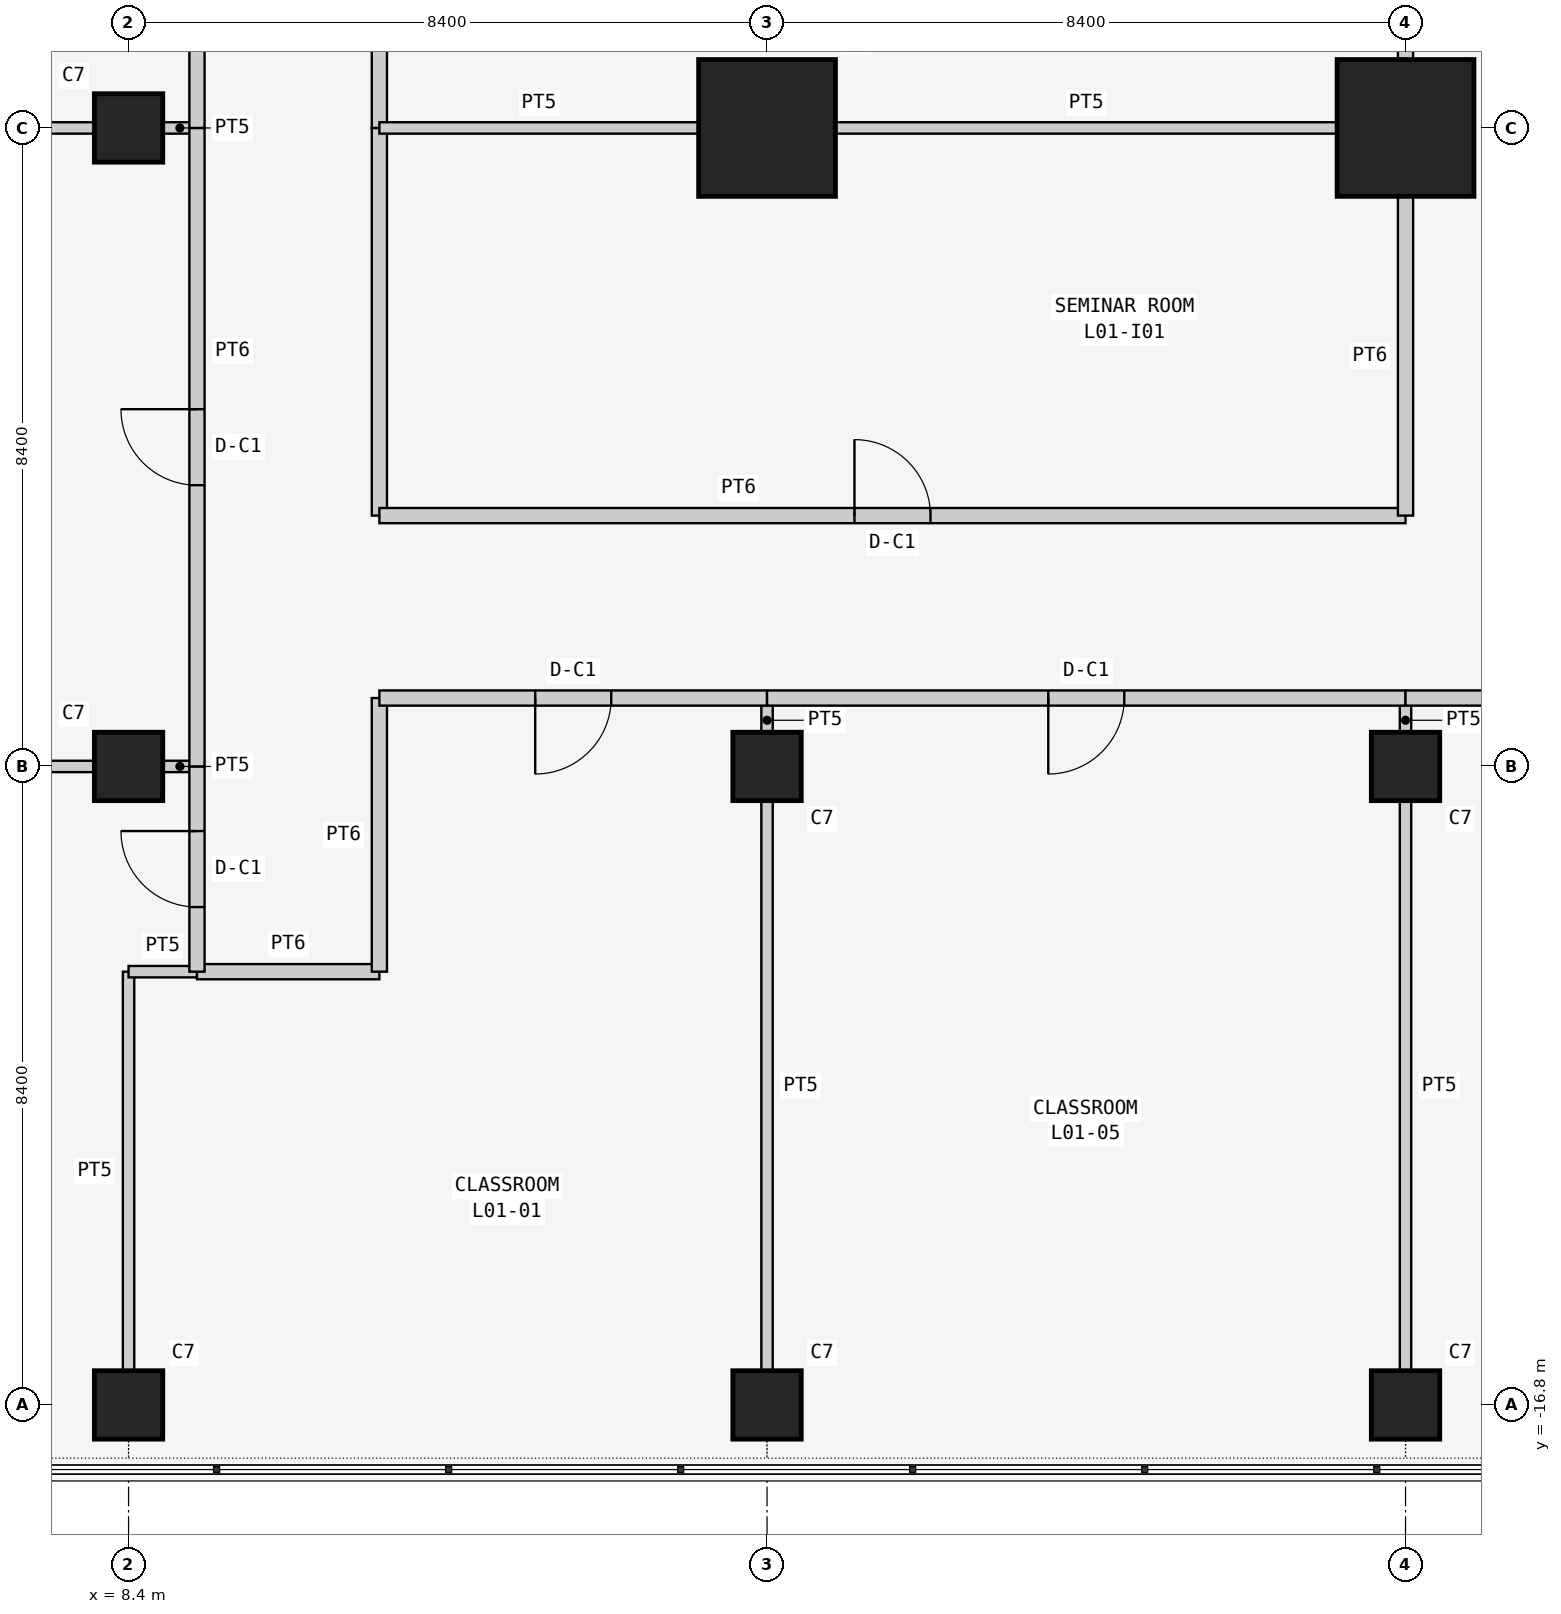
"""IFC4 building model, lengths in metres.
Left out: names, types, materials, properties, quantities, classifications, styles, units other than length and angle.
Written with IfcOpenShell. Run it as: python <this file> out.ifc"""

import sys

from ifc_helpers import new_model, si_unit, direction, frame, frame_2d, origin, origin_2d, place, context, subcontext, project, spatial, rectangle, extrude, element, fill, save


model = new_model("IFC4")
c1 = context("Model", 3, precision=1e-05, world=origin(), true_north=direction((0.0, 1.0)))
c2 = subcontext(c1, "Body", "Model", "MODEL_VIEW")
j1 = project(units=[si_unit("LENGTHUNIT", "METRE"), si_unit("PLANEANGLEUNIT", "RADIAN")], contexts=[c1])
p1 = place(None, origin())
s1 = spatial("IfcSite", under=j1, at=p1, CompositionType="ELEMENT")
p2 = place(p1, origin())
s2 = spatial("IfcBuilding", under=s1, at=p2, CompositionType="ELEMENT")
p3 = place(p2, frame((0.0, 0.0, 6.0)))
s3 = spatial("IfcBuildingStorey", under=s2, at=p3, CompositionType="ELEMENT", Elevation=6.0)
for number, where, z_axis, x_axis in (
    (1, (8.4, -16.8, 0.0), (0.0, 0.0, 1.0), (1.0, 0.0, 0.0)),
    (2, (8.4, -8.4, 0.0), (0.0, 0.0, 1.0), (1.0, 0.0, 0.0)),
    (3, (8.4, 0.0, 0.0), (0.0, 0.0, 1.0), (1.0, 0.0, 0.0)),
    (4, (16.8, -16.8, 0.0), (0.0, 0.0, 1.0), (1.0, 0.0, 0.0)),
    (5, (16.8, -8.4, 0.0), (0.0, 0.0, 1.0), (1.0, 0.0, 0.0)),
):
    element("IfcColumn", number, at=place(p3, frame(where, z_axis=z_axis, x_axis=x_axis)), inside=s3, PredefinedType="COLUMN", context=c2, shape_type="SweptSolid", body=[
        extrude(rectangle(XDim=0.9, YDim=0.9, at=origin_2d()), origin(), (0.0, 0.0, 1.0), 4.5),
    ])
p4 = place(p3, frame((16.8, 0.0, 0.0), z_axis=(0.0, 0.0, 1.0), x_axis=(1.0, 0.0, 0.0)))
e6 = element("IfcColumn", 6, at=p4, inside=s3, PredefinedType="COLUMN", context=c2, shape_type="SweptSolid", body=[
    extrude(rectangle(XDim=1.8, YDim=1.8, at=origin_2d()), origin(), (0.0, 0.0, 1.0), 4.5),
])
for number, where, z_axis, x_axis in (
    (7, (25.2, -16.8, 0.0), (0.0, 0.0, 1.0), (1.0, 0.0, 0.0)),
    (8, (25.2, -8.4, 0.0), (0.0, 0.0, 1.0), (1.0, 0.0, 0.0)),
):
    element("IfcColumn", number, at=place(p3, frame(where, z_axis=z_axis, x_axis=x_axis)), inside=s3, PredefinedType="COLUMN", context=c2, shape_type="SweptSolid", body=[
        extrude(rectangle(XDim=0.9, YDim=0.9, at=origin_2d()), origin(), (0.0, 0.0, 1.0), 4.5),
    ])
p5 = place(p3, frame((25.2, 0.0, 0.0), z_axis=(0.0, 0.0, 1.0), x_axis=(1.0, 0.0, 0.0)))
e9 = element("IfcColumn", 9, at=p5, inside=s3, PredefinedType="COLUMN", context=c2, shape_type="SweptSolid", body=[
    extrude(rectangle(XDim=1.8, YDim=1.8, at=origin_2d()), origin(), (0.0, 0.0, 1.0), 4.5),
])
p6 = place(p3, frame((8.4, -16.35, 0.0), z_axis=(0.0, 0.0, 1.0), x_axis=(0.0, 1.0, 0.0)))
e10 = element("IfcWall", 10, at=p6, inside=s3, PredefinedType="PARTITIONING", context=c2, shape_type="SweptSolid", body=[
    extrude(rectangle(XDim=5.25, YDim=0.15, at=frame_2d((2.625, 0.0))), origin(), (0.0, 0.0, 1.0), 3.543),
])
p7 = place(p3, frame((8.4, -11.1, 0.0), z_axis=(0.0, 0.0, 1.0), x_axis=(1.0, 0.0, 0.0)))
e11 = element("IfcWall", 11, at=p7, inside=s3, PredefinedType="PARTITIONING", context=c2, shape_type="SweptSolid", body=[
    extrude(rectangle(XDim=0.9, YDim=0.15, at=frame_2d((0.45, 0.0))), origin(), (0.0, 0.0, 1.0), 4.3),
])
p8 = place(p3, frame((16.8, -8.85, 0.0), z_axis=(0.0, 0.0, 1.0), x_axis=(0.0, -1.0, 0.0)))
e12 = element("IfcWall", 12, at=p8, inside=s3, PredefinedType="PARTITIONING", context=c2, shape_type="SweptSolid", body=[
    extrude(rectangle(XDim=7.5, YDim=0.15, at=frame_2d((3.75, 0.0))), origin(), (0.0, 0.0, 1.0), 3.543),
])
p9 = place(p3, frame((16.8, -7.5, 0.0), z_axis=(0.0, 0.0, 1.0), x_axis=(0.0, -1.0, 0.0)))
e13 = element("IfcWall", 13, at=p9, inside=s3, PredefinedType="PARTITIONING", context=c2, shape_type="SweptSolid", body=[
    extrude(rectangle(XDim=0.45, YDim=0.15, at=frame_2d((0.225, 0.0))), origin(), (0.0, 0.0, 1.0), 3.543),
])
p10 = place(p3, frame((9.3, -11.1, 0.0), z_axis=(0.0, 0.0, 1.0), x_axis=(1.0, 0.0, 0.0)))
e14 = element("IfcWall", 14, at=p10, inside=s3, PredefinedType="PARTITIONING", context=c2, shape_type="SweptSolid", body=[
    extrude(rectangle(XDim=2.4, YDim=0.2, at=frame_2d((1.2, 0.0))), origin(), (0.0, 0.0, 1.0), 4.3),
])
p11 = place(p3, frame((11.7, -11.1, 0.0), z_axis=(0.0, 0.0, 1.0), x_axis=(0.0, 1.0, 0.0)))
e15 = element("IfcWall", 15, at=p11, inside=s3, PredefinedType="PARTITIONING", context=c2, shape_type="SweptSolid", body=[
    extrude(rectangle(XDim=3.6, YDim=0.2, at=frame_2d((1.8, 0.0))), origin(), (0.0, 0.0, 1.0), 4.3),
])
p12 = place(p3, frame((11.7, -7.5, 0.0), z_axis=(0.0, 0.0, 1.0), x_axis=(1.0, 0.0, 0.0)))
e16 = element("IfcWall", 16, at=p12, inside=s3, PredefinedType="PARTITIONING", context=c2, shape_type="SweptSolid", body=[
    extrude(rectangle(XDim=5.1, YDim=0.2, at=frame_2d((2.55, 0.0))), origin(), (0.0, 0.0, 1.0), 4.3),
])
p13 = place(p12, frame((2.05, 0.0, 0.0)))
e17 = element("IfcOpeningElement", 17, at=p13, cuts=e16, PredefinedType="OPENING", context=c2, shape_type="SweptSolid", body=[
    extrude(rectangle(XDim=1.0, YDim=2.1, at=frame_2d((0.5, 1.05))), frame((0.0, 0.11, 0.0), z_axis=(0.0, -1.0, 0.0), x_axis=(1.0, 0.0, 0.0)), (0.0, 0.0, 1.0), 0.22),
])
p14 = place(p3, frame((0.45, -8.4, 0.0), z_axis=(0.0, 0.0, 1.0), x_axis=(1.0, 0.0, 0.0)))
e18 = element("IfcWall", 18, at=p14, inside=s3, PredefinedType="PARTITIONING", context=c2, shape_type="SweptSolid", body=[
    extrude(rectangle(XDim=7.5, YDim=0.15, at=frame_2d((3.75, 0.0))), origin(), (0.0, 0.0, 1.0), 3.543),
])
p15 = place(p3, frame((8.85, -8.4, 0.0), z_axis=(0.0, 0.0, 1.0), x_axis=(1.0, 0.0, 0.0)))
e19 = element("IfcWall", 19, at=p15, inside=s3, PredefinedType="PARTITIONING", context=c2, shape_type="SweptSolid", body=[
    extrude(rectangle(XDim=0.45, YDim=0.15, at=frame_2d((0.225, 0.0))), origin(), (0.0, 0.0, 1.0), 3.543),
])
p16 = place(p3, frame((9.3, -8.4, 0.0), z_axis=(0.0, 0.0, 1.0), x_axis=(0.0, -1.0, 0.0)))
e20 = element("IfcWall", 20, at=p16, inside=s3, PredefinedType="PARTITIONING", context=c2, shape_type="SweptSolid", body=[
    extrude(rectangle(XDim=2.7, YDim=0.2, at=frame_2d((1.35, 0.0))), origin(), (0.0, 0.0, 1.0), 4.3),
])
p17 = place(p16, frame((0.85, 0.0, 0.0)))
e21 = element("IfcOpeningElement", 21, at=p17, cuts=e20, PredefinedType="OPENING", context=c2, shape_type="SweptSolid", body=[
    extrude(rectangle(XDim=1.0, YDim=2.1, at=frame_2d((0.5, 1.05))), frame((0.0, 0.11, 0.0), z_axis=(0.0, -1.0, 0.0), x_axis=(1.0, 0.0, 0.0)), (0.0, 0.0, 1.0), 0.22),
])
p18 = place(p3, frame((25.2, -8.85, 0.0), z_axis=(0.0, 0.0, 1.0), x_axis=(0.0, -1.0, 0.0)))
e22 = element("IfcWall", 22, at=p18, inside=s3, PredefinedType="PARTITIONING", context=c2, shape_type="SweptSolid", body=[
    extrude(rectangle(XDim=7.5, YDim=0.15, at=frame_2d((3.75, 0.0))), origin(), (0.0, 0.0, 1.0), 3.543),
])
p19 = place(p3, frame((25.2, -7.5, 0.0), z_axis=(0.0, 0.0, 1.0), x_axis=(0.0, -1.0, 0.0)))
e23 = element("IfcWall", 23, at=p19, inside=s3, PredefinedType="PARTITIONING", context=c2, shape_type="SweptSolid", body=[
    extrude(rectangle(XDim=0.45, YDim=0.15, at=frame_2d((0.225, 0.0))), origin(), (0.0, 0.0, 1.0), 3.543),
])
p20 = place(p3, frame((16.8, -7.5, 0.0), z_axis=(0.0, 0.0, 1.0), x_axis=(1.0, 0.0, 0.0)))
e24 = element("IfcWall", 24, at=p20, inside=s3, PredefinedType="PARTITIONING", context=c2, shape_type="SweptSolid", body=[
    extrude(rectangle(XDim=8.4, YDim=0.2, at=frame_2d((4.2, 0.0))), origin(), (0.0, 0.0, 1.0), 4.3),
])
p21 = place(p20, frame((3.7, 0.0, 0.0)))
e25 = element("IfcOpeningElement", 25, at=p21, cuts=e24, PredefinedType="OPENING", context=c2, shape_type="SweptSolid", body=[
    extrude(rectangle(XDim=1.0, YDim=2.1, at=frame_2d((0.5, 1.05))), frame((0.0, 0.11, 0.0), z_axis=(0.0, -1.0, 0.0), x_axis=(1.0, 0.0, 0.0)), (0.0, 0.0, 1.0), 0.22),
])
p22 = place(p3, frame((25.2, -7.5, 0.0), z_axis=(0.0, 0.0, 1.0), x_axis=(1.0, 0.0, 0.0)))
e26 = element("IfcWall", 26, at=p22, inside=s3, PredefinedType="PARTITIONING", context=c2, shape_type="SweptSolid", body=[
    extrude(rectangle(XDim=8.4, YDim=0.2, at=frame_2d((4.2, 0.0))), origin(), (0.0, 0.0, 1.0), 4.3),
])
p23 = place(p22, frame((3.7, 0.0, 0.0)))
e27 = element("IfcOpeningElement", 27, at=p23, cuts=e26, PredefinedType="OPENING", context=c2, shape_type="SweptSolid", body=[
    extrude(rectangle(XDim=1.0, YDim=2.1, at=frame_2d((0.5, 1.05))), frame((0.0, 0.11, 0.0), z_axis=(0.0, -1.0, 0.0), x_axis=(1.0, 0.0, 0.0)), (0.0, 0.0, 1.0), 0.22),
])
p24 = place(p3, frame((0.45, 0.0, 0.0), z_axis=(0.0, 0.0, 1.0), x_axis=(1.0, 0.0, 0.0)))
e28 = element("IfcWall", 28, at=p24, inside=s3, PredefinedType="PARTITIONING", context=c2, shape_type="SweptSolid", body=[
    extrude(rectangle(XDim=7.5, YDim=0.15, at=frame_2d((3.75, 0.0))), origin(), (0.0, 0.0, 1.0), 3.543),
])
p25 = place(p3, frame((8.85, 0.0, 0.0), z_axis=(0.0, 0.0, 1.0), x_axis=(1.0, 0.0, 0.0)))
e29 = element("IfcWall", 29, at=p25, inside=s3, PredefinedType="PARTITIONING", context=c2, shape_type="SweptSolid", body=[
    extrude(rectangle(XDim=0.45, YDim=0.15, at=frame_2d((0.225, 0.0))), origin(), (0.0, 0.0, 1.0), 3.543),
])
p26 = place(p3, frame((9.3, 0.0, 0.0), z_axis=(0.0, 0.0, 1.0), x_axis=(0.0, -1.0, 0.0)))
e30 = element("IfcWall", 30, at=p26, inside=s3, PredefinedType="PARTITIONING", context=c2, shape_type="SweptSolid", body=[
    extrude(rectangle(XDim=8.4, YDim=0.2, at=frame_2d((4.2, 0.0))), origin(), (0.0, 0.0, 1.0), 4.3),
])
p27 = place(p26, frame((3.7, 0.0, 0.0)))
e31 = element("IfcOpeningElement", 31, at=p27, cuts=e30, PredefinedType="OPENING", context=c2, shape_type="SweptSolid", body=[
    extrude(rectangle(XDim=1.0, YDim=2.1, at=frame_2d((0.5, 1.05))), frame((0.0, 0.11, 0.0), z_axis=(0.0, -1.0, 0.0), x_axis=(1.0, 0.0, 0.0)), (0.0, 0.0, 1.0), 0.22),
])
p28 = place(p3, frame((9.3, 8.4, 0.0), z_axis=(0.0, 0.0, 1.0), x_axis=(0.0, -1.0, 0.0)))
e32 = element("IfcWall", 32, at=p28, inside=s3, PredefinedType="PARTITIONING", context=c2, shape_type="SweptSolid", body=[
    extrude(rectangle(XDim=8.4, YDim=0.2, at=frame_2d((4.2, 0.0))), origin(), (0.0, 0.0, 1.0), 4.3),
])
p29 = place(p28, frame((3.7, 0.0, 0.0)))
e33 = element("IfcOpeningElement", 33, at=p29, cuts=e32, PredefinedType="OPENING", context=c2, shape_type="SweptSolid", body=[
    extrude(rectangle(XDim=1.0, YDim=2.1, at=frame_2d((0.5, 1.05))), frame((0.0, 0.11, 0.0), z_axis=(0.0, -1.0, 0.0), x_axis=(1.0, 0.0, 0.0)), (0.0, 0.0, 1.0), 0.22),
])
p30 = place(p3, frame((11.7, 0.0, 0.0), z_axis=(0.0, 0.0, 1.0), x_axis=(0.0, -1.0, 0.0)))
e34 = element("IfcWall", 34, at=p30, inside=s3, PredefinedType="PARTITIONING", context=c2, shape_type="SweptSolid", body=[
    extrude(rectangle(XDim=5.1, YDim=0.2, at=frame_2d((2.55, 0.0))), origin(), (0.0, 0.0, 1.0), 4.3),
])
p31 = place(p3, frame((11.7, -5.1, 0.0), z_axis=(0.0, 0.0, 1.0), x_axis=(1.0, 0.0, 0.0)))
e35 = element("IfcWall", 35, at=p31, inside=s3, PredefinedType="PARTITIONING", context=c2, shape_type="SweptSolid", body=[
    extrude(rectangle(XDim=13.5, YDim=0.2, at=frame_2d((6.75, 0.0))), origin(), (0.0, 0.0, 1.0), 4.3),
])
p32 = place(p31, frame((6.25, 0.0, 0.0)))
e36 = element("IfcOpeningElement", 36, at=p32, cuts=e35, PredefinedType="OPENING", context=c2, shape_type="SweptSolid", body=[
    extrude(rectangle(XDim=1.0, YDim=2.1, at=frame_2d((0.5, 1.05))), frame((0.0, 0.11, 0.0), z_axis=(0.0, -1.0, 0.0), x_axis=(1.0, 0.0, 0.0)), (0.0, 0.0, 1.0), 0.22),
])
p33 = place(p3, frame((25.2, -5.1, 0.0), z_axis=(0.0, 0.0, 1.0), x_axis=(0.0, 1.0, 0.0)))
e37 = element("IfcWall", 37, at=p33, inside=s3, PredefinedType="PARTITIONING", context=c2, shape_type="SweptSolid", body=[
    extrude(rectangle(XDim=4.2, YDim=0.2, at=frame_2d((2.1, 0.0))), origin(), (0.0, 0.0, 1.0), 3.543),
])
p34 = place(p3, frame((11.7, 8.4, 0.0), z_axis=(0.0, 0.0, 1.0), x_axis=(0.0, -1.0, 0.0)))
e38 = element("IfcWall", 38, at=p34, inside=s3, PredefinedType="PARTITIONING", context=c2, shape_type="SweptSolid", body=[
    extrude(rectangle(XDim=8.4, YDim=0.2, at=frame_2d((4.2, 0.0))), origin(), (0.0, 0.0, 1.0), 4.3),
])
p35 = place(p34, frame((3.7, 0.0, 0.0)))
e39 = element("IfcOpeningElement", 39, at=p35, cuts=e38, PredefinedType="OPENING", context=c2, shape_type="SweptSolid", body=[
    extrude(rectangle(XDim=1.0, YDim=2.1, at=frame_2d((0.5, 1.05))), frame((0.0, 0.11, 0.0), z_axis=(0.0, -1.0, 0.0), x_axis=(1.0, 0.0, 0.0)), (0.0, 0.0, 1.0), 0.22),
])
p36 = place(p3, frame((25.2, 0.9, 0.0), z_axis=(0.0, 0.0, 1.0), x_axis=(0.0, 1.0, 0.0)))
e40 = element("IfcWall", 40, at=p36, inside=s3, PredefinedType="PARTITIONING", context=c2, shape_type="SweptSolid", body=[
    extrude(rectangle(XDim=6.6, YDim=0.2, at=frame_2d((3.3, 0.0))), origin(), (0.0, 0.0, 1.0), 3.543),
])
p37 = place(p3, frame((11.7, 0.0, 0.0), z_axis=(0.0, 0.0, 1.0), x_axis=(1.0, 0.0, 0.0)))
e41 = element("IfcWall", 41, at=p37, inside=s3, PredefinedType="PARTITIONING", context=c2, shape_type="SweptSolid", body=[
    extrude(rectangle(XDim=4.2, YDim=0.15, at=frame_2d((2.1, 0.0))), origin(), (0.0, 0.0, 1.0), 3.543),
])
p38 = place(p3, frame((17.7, 0.0, 0.0), z_axis=(0.0, 0.0, 1.0), x_axis=(1.0, 0.0, 0.0)))
e42 = element("IfcWall", 42, at=p38, inside=s3, PredefinedType="PARTITIONING", context=c2, shape_type="SweptSolid", body=[
    extrude(rectangle(XDim=6.6, YDim=0.15, at=frame_2d((3.3, 0.0))), origin(), (0.0, 0.0, 1.0), 3.543),
])
p39 = place(p13, frame((1.0, 0.0, 0.0), z_axis=(0.0, 0.0, 1.0), x_axis=(-1.0, 0.0, 0.0)))
e43 = element("IfcDoor", 43, at=p39, inside=s3, OperationType="SINGLE_SWING_RIGHT", PredefinedType="DOOR", context=c2, shape_type="SweptSolid", body=[
    extrude(rectangle(XDim=1.0, YDim=2.1, at=frame_2d((0.5, 1.05))), frame((0.0, 0.025, 0.0), z_axis=(0.0, -1.0, 0.0), x_axis=(1.0, 0.0, 0.0)), (0.0, 0.0, 1.0), 0.05),
])
fill(e17, e43)
p40 = place(p17, frame((1.0, 0.0, 0.0), z_axis=(0.0, 0.0, 1.0), x_axis=(-1.0, 0.0, 0.0)))
e44 = element("IfcDoor", 44, at=p40, inside=s3, OperationType="SINGLE_SWING_RIGHT", PredefinedType="DOOR", context=c2, shape_type="SweptSolid", body=[
    extrude(rectangle(XDim=1.0, YDim=2.1, at=frame_2d((0.5, 1.05))), frame((0.0, 0.025, 0.0), z_axis=(0.0, -1.0, 0.0), x_axis=(1.0, 0.0, 0.0)), (0.0, 0.0, 1.0), 0.05),
])
fill(e21, e44)
p41 = place(p21, frame((1.0, 0.0, 0.0), z_axis=(0.0, 0.0, 1.0), x_axis=(-1.0, 0.0, 0.0)))
e45 = element("IfcDoor", 45, at=p41, inside=s3, OperationType="SINGLE_SWING_RIGHT", PredefinedType="DOOR", context=c2, shape_type="SweptSolid", body=[
    extrude(rectangle(XDim=1.0, YDim=2.1, at=frame_2d((0.5, 1.05))), frame((0.0, 0.025, 0.0), z_axis=(0.0, -1.0, 0.0), x_axis=(1.0, 0.0, 0.0)), (0.0, 0.0, 1.0), 0.05),
])
fill(e25, e45)
p42 = place(p27, frame((1.0, 0.0, 0.0), z_axis=(0.0, 0.0, 1.0), x_axis=(-1.0, 0.0, 0.0)))
e46 = element("IfcDoor", 46, at=p42, inside=s3, OperationType="SINGLE_SWING_RIGHT", PredefinedType="DOOR", context=c2, shape_type="SweptSolid", body=[
    extrude(rectangle(XDim=1.0, YDim=2.1, at=frame_2d((0.5, 1.05))), frame((0.0, 0.025, 0.0), z_axis=(0.0, -1.0, 0.0), x_axis=(1.0, 0.0, 0.0)), (0.0, 0.0, 1.0), 0.05),
])
fill(e31, e46)
p43 = place(p32, origin())
e47 = element("IfcDoor", 47, at=p43, inside=s3, OperationType="SINGLE_SWING_LEFT", PredefinedType="DOOR", context=c2, shape_type="SweptSolid", body=[
    extrude(rectangle(XDim=1.0, YDim=2.1, at=frame_2d((0.5, 1.05))), frame((0.0, 0.025, 0.0), z_axis=(0.0, -1.0, 0.0), x_axis=(1.0, 0.0, 0.0)), (0.0, 0.0, 1.0), 0.05),
])
fill(e36, e47)
save(model, sys.argv[1])
